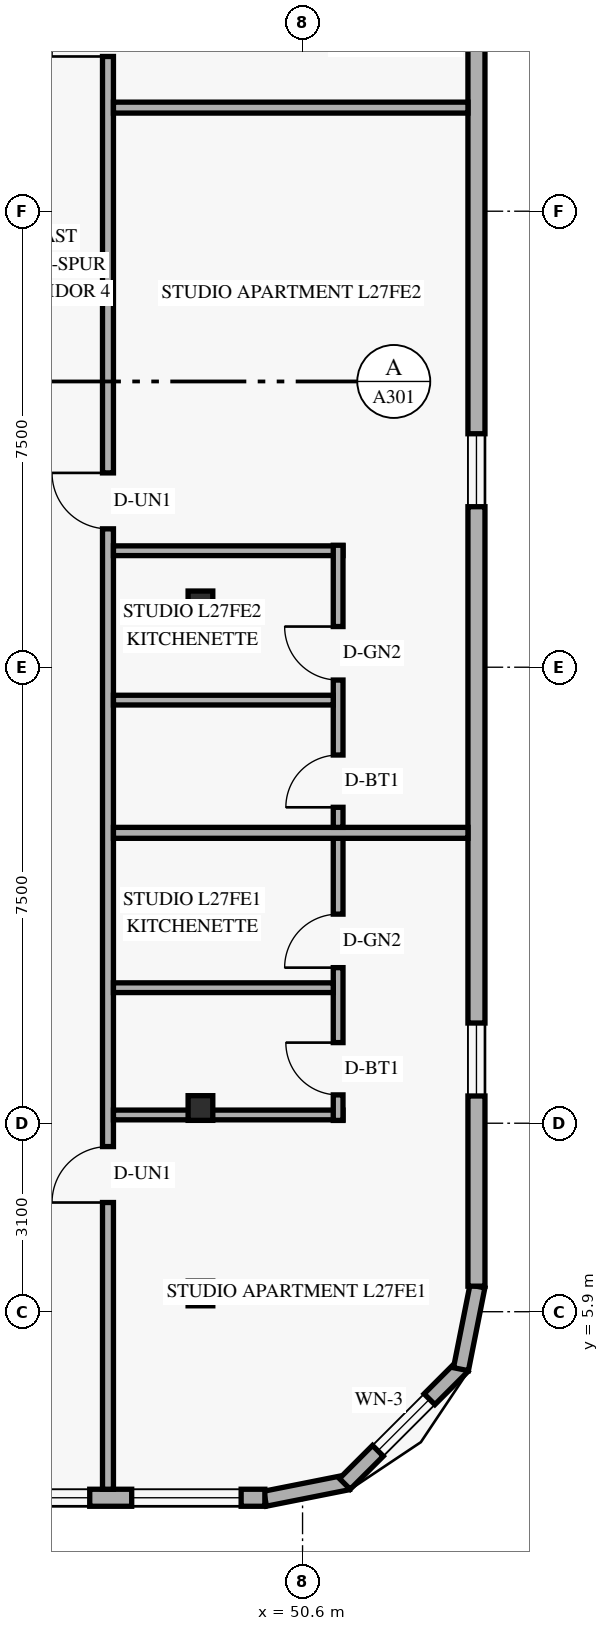
"""IFC4 building model, lengths in metres.
Left out: names, types, materials, properties, quantities, classifications, styles, units other than length and angle.
Written with IfcOpenShell. Run it as: python <this file> out.ifc"""

import sys

from ifc_helpers import new_model, si_unit, direction, frame, frame_2d, origin, origin_2d, place, context, subcontext, project, spatial, rectangle, hollow_rectangle, extrude, element, fill, save


model = new_model("IFC4")
c1 = context("Model", 3, precision=1e-05, world=origin(), true_north=direction((0.0, 1.0)))
c2 = subcontext(c1, "Body", "Model", "MODEL_VIEW")
j1 = project(units=[si_unit("LENGTHUNIT", "METRE"), si_unit("PLANEANGLEUNIT", "RADIAN")], contexts=[c1])
p1 = place(None, origin())
s1 = spatial("IfcSite", under=j1, at=p1, CompositionType="ELEMENT")
p2 = place(p1, origin())
s2 = spatial("IfcBuilding", under=s1, at=p2, CompositionType="ELEMENT")
p3 = place(p2, frame((0.0, 0.0, 106.2)))
s3 = spatial("IfcBuildingStorey", under=s2, at=p3, CompositionType="ELEMENT", Elevation=106.2)
for number, where, z_axis, x_axis in (
    (1, (48.816, 6.2, 0.0), (0.058, 0.0, 0.998), (0.0, 1.0, 0.0)),
    (2, (48.816, 9.25, 0.0), (0.058, 0.0, 0.998), (0.0, 1.0, 0.0)),
    (3, (48.816, 17.55, 0.0), (0.058, 0.0, 0.998), (0.0, 1.0, 0.0)),
):
    element("IfcColumn", number, at=place(p3, frame(where, z_axis=z_axis, x_axis=x_axis)), inside=s3, PredefinedType="COLUMN", context=c2, shape_type="SweptSolid", body=[
        extrude(hollow_rectangle(XDim=0.406, YDim=0.406, WallThickness=0.016, at=origin_2d()), origin(), (0.0, 0.0, 1.0), 3.606),
    ])
p4 = place(p3, frame((49.983, 2.824, 0.0), z_axis=(0.0, 0.0, 1.0), x_axis=(0.980809899341, 0.19496651342, 0.0)))
e4 = element("IfcWall", 4, at=p4, inside=s3, PredefinedType="SOLIDWALL", context=c2, shape_type="SweptSolid", body=[
    extrude(rectangle(XDim=1.389, YDim=0.25, at=frame_2d((0.694, 0.0))), origin(), (0.0, 0.0, 1.0), 3.36),
])
p5 = place(p3, frame((51.295, 3.068, 0.0), z_axis=(0.0, 0.0, 1.0), x_axis=(0.707151344399, 0.707062215165, 0.0)))
e5 = element("IfcWall", 5, at=p5, inside=s3, PredefinedType="SOLIDWALL", context=c2, shape_type="SweptSolid", body=[
    extrude(rectangle(XDim=2.739, YDim=0.25, at=frame_2d((1.37, 0.0))), origin(), (0.0, 0.0, 1.0), 3.36),
])
p6 = place(p5, frame((0.77, 0.0, 0.85)))
e6 = element("IfcOpeningElement", 6, at=p6, cuts=e5, PredefinedType="OPENING", context=c2, shape_type="SweptSolid", body=[
    extrude(rectangle(XDim=1.2, YDim=1.5, at=frame_2d((0.6, 0.75))), frame((0.0, 0.135, 0.0), z_axis=(0.0, -1.0, 0.0), x_axis=(1.0, 0.0, 0.0)), (0.0, 0.0, 1.0), 0.27),
])
p7 = place(p3, frame((53.205, 4.955, 0.0), z_axis=(0.0, 0.0, 1.0), x_axis=(0.195000137217, 0.980803214965, 0.0)))
e7 = element("IfcWall", 7, at=p7, inside=s3, PredefinedType="SOLIDWALL", context=c2, shape_type="SweptSolid", body=[
    extrude(rectangle(XDim=1.388, YDim=0.25, at=frame_2d((0.694, 0.0))), origin(), (0.0, 0.0, 1.0), 3.36),
])
p8 = place(p3, frame((13.42, 2.84, 0.0), z_axis=(0.0, 0.0, 1.0), x_axis=(1.0, 0.0, 0.0)))
e8 = element("IfcWall", 8, at=p8, inside=s3, PredefinedType="SOLIDWALL", context=c2, shape_type="SweptSolid", body=[
    extrude(rectangle(XDim=36.56, YDim=0.28, at=frame_2d((18.28, 0.0))), origin(), (0.0, 0.0, 1.0), 3.36),
])
p9 = place(p8, frame((3.215, 0.0, 0.85)))
e9 = element("IfcOpeningElement", 9, at=p9, cuts=e8, PredefinedType="OPENING", context=c2, shape_type="SweptSolid", body=[
    extrude(rectangle(XDim=1.8, YDim=1.6, at=frame_2d((0.9, 0.8))), frame((0.0, 0.15, 0.0), z_axis=(0.0, -1.0, 0.0), x_axis=(1.0, 0.0, 0.0)), (0.0, 0.0, 1.0), 0.3),
])
p10 = place(p8, frame((10.055, 0.0, 0.85)))
e10 = element("IfcOpeningElement", 10, at=p10, cuts=e8, PredefinedType="OPENING", context=c2, shape_type="SweptSolid", body=[
    extrude(rectangle(XDim=1.8, YDim=1.6, at=frame_2d((0.9, 0.8))), frame((0.0, 0.15, 0.0), z_axis=(0.0, -1.0, 0.0), x_axis=(1.0, 0.0, 0.0)), (0.0, 0.0, 1.0), 0.3),
])
p11 = place(p8, frame((16.94, 0.0, 0.85)))
e11 = element("IfcOpeningElement", 11, at=p11, cuts=e8, PredefinedType="OPENING", context=c2, shape_type="SweptSolid", body=[
    extrude(rectangle(XDim=1.8, YDim=1.6, at=frame_2d((0.9, 0.8))), frame((0.0, 0.15, 0.0), z_axis=(0.0, -1.0, 0.0), x_axis=(1.0, 0.0, 0.0)), (0.0, 0.0, 1.0), 0.3),
])
p12 = place(p8, frame((22.365, 0.0, 0.85)))
e12 = element("IfcOpeningElement", 12, at=p12, cuts=e8, PredefinedType="OPENING", context=c2, shape_type="SweptSolid", body=[
    extrude(rectangle(XDim=1.8, YDim=1.6, at=frame_2d((0.9, 0.8))), frame((0.0, 0.15, 0.0), z_axis=(0.0, -1.0, 0.0), x_axis=(1.0, 0.0, 0.0)), (0.0, 0.0, 1.0), 0.3),
])
p13 = place(p8, frame((27.455, 0.0, 0.85)))
e13 = element("IfcOpeningElement", 13, at=p13, cuts=e8, PredefinedType="OPENING", context=c2, shape_type="SweptSolid", body=[
    extrude(rectangle(XDim=1.8, YDim=1.6, at=frame_2d((0.9, 0.8))), frame((0.0, 0.15, 0.0), z_axis=(0.0, -1.0, 0.0), x_axis=(1.0, 0.0, 0.0)), (0.0, 0.0, 1.0), 0.3),
])
p14 = place(p8, frame((32.48, 0.0, 0.85)))
e14 = element("IfcOpeningElement", 14, at=p14, cuts=e8, PredefinedType="OPENING", context=c2, shape_type="SweptSolid", body=[
    extrude(rectangle(XDim=1.2, YDim=1.5, at=frame_2d((0.6, 0.75))), frame((0.0, 0.15, 0.0), z_axis=(0.0, -1.0, 0.0), x_axis=(1.0, 0.0, 0.0)), (0.0, 0.0, 1.0), 0.3),
])
p15 = place(p8, frame((34.37, 0.0, 0.85)))
e15 = element("IfcOpeningElement", 15, at=p15, cuts=e8, PredefinedType="OPENING", context=c2, shape_type="SweptSolid", body=[
    extrude(rectangle(XDim=1.8, YDim=1.6, at=frame_2d((0.9, 0.8))), frame((0.0, 0.15, 0.0), z_axis=(0.0, -1.0, 0.0), x_axis=(1.0, 0.0, 0.0)), (0.0, 0.0, 1.0), 0.3),
])
p16 = place(p3, frame((53.46, 6.32, 0.0), z_axis=(0.0, 0.0, 1.0), x_axis=(0.0, 1.0, 0.0)))
e16 = element("IfcWall", 16, at=p16, inside=s3, PredefinedType="SOLIDWALL", context=c2, shape_type="SweptSolid", body=[
    extrude(rectangle(XDim=35.36, YDim=0.28, at=frame_2d((17.68, 0.0))), origin(), (0.0, 0.0, 1.0), 3.36),
])
p17 = place(p16, frame((3.128, 0.0, 0.85)))
e17 = element("IfcOpeningElement", 17, at=p17, cuts=e16, PredefinedType="OPENING", context=c2, shape_type="SweptSolid", body=[
    extrude(rectangle(XDim=1.2, YDim=1.5, at=frame_2d((0.6, 0.75))), frame((0.0, 0.15, 0.0), z_axis=(0.0, -1.0, 0.0), x_axis=(1.0, 0.0, 0.0)), (0.0, 0.0, 1.0), 0.3),
])
p18 = place(p16, frame((12.82, 0.0, 0.85)))
e18 = element("IfcOpeningElement", 18, at=p18, cuts=e16, PredefinedType="OPENING", context=c2, shape_type="SweptSolid", body=[
    extrude(rectangle(XDim=1.2, YDim=1.5, at=frame_2d((0.6, 0.75))), frame((0.0, 0.15, 0.0), z_axis=(0.0, -1.0, 0.0), x_axis=(1.0, 0.0, 0.0)), (0.0, 0.0, 1.0), 0.3),
])
p19 = place(p16, frame((22.194, 0.0, 0.85)))
e19 = element("IfcOpeningElement", 19, at=p19, cuts=e16, PredefinedType="OPENING", context=c2, shape_type="SweptSolid", body=[
    extrude(rectangle(XDim=1.2, YDim=1.5, at=frame_2d((0.6, 0.75))), frame((0.0, 0.15, 0.0), z_axis=(0.0, -1.0, 0.0), x_axis=(1.0, 0.0, 0.0)), (0.0, 0.0, 1.0), 0.3),
])
p20 = place(p16, frame((27.306, 0.0, 0.85)))
e20 = element("IfcOpeningElement", 20, at=p20, cuts=e16, PredefinedType="OPENING", context=c2, shape_type="SweptSolid", body=[
    extrude(rectangle(XDim=1.2, YDim=1.5, at=frame_2d((0.6, 0.75))), frame((0.0, 0.15, 0.0), z_axis=(0.0, -1.0, 0.0), x_axis=(1.0, 0.0, 0.0)), (0.0, 0.0, 1.0), 0.3),
])
p21 = place(p16, frame((31.884, 0.0, 0.85)))
e21 = element("IfcOpeningElement", 21, at=p21, cuts=e16, PredefinedType="OPENING", context=c2, shape_type="SweptSolid", body=[
    extrude(rectangle(XDim=1.2, YDim=1.5, at=frame_2d((0.6, 0.75))), frame((0.0, 0.15, 0.0), z_axis=(0.0, -1.0, 0.0), x_axis=(1.0, 0.0, 0.0)), (0.0, 0.0, 1.0), 0.3),
])
p22 = place(p3, frame((47.4, 2.98, 0.0), z_axis=(0.0, 0.0, 1.0), x_axis=(0.0, 1.0, 0.0)))
e22 = element("IfcWall", 22, at=p22, inside=s3, PredefinedType="STANDARD", context=c2, shape_type="SweptSolid", body=[
    extrude(rectangle(XDim=42.04, YDim=0.18, at=frame_2d((21.02, 0.0))), origin(), (0.0, 0.0, 1.0), 2.731),
])
p23 = place(p22, frame((4.716, 0.0, 0.0)))
e23 = element("IfcOpeningElement", 23, at=p23, cuts=e22, PredefinedType="OPENING", context=c2, shape_type="SweptSolid", body=[
    extrude(rectangle(XDim=0.92, YDim=2.15, at=frame_2d((0.46, 1.075))), frame((0.0, 0.1, 0.0), z_axis=(0.0, -1.0, 0.0), x_axis=(1.0, 0.0, 0.0)), (0.0, 0.0, 1.0), 0.2),
])
p24 = place(p22, frame((15.796, 0.0, 0.0)))
e24 = element("IfcOpeningElement", 24, at=p24, cuts=e22, PredefinedType="OPENING", context=c2, shape_type="SweptSolid", body=[
    extrude(rectangle(XDim=0.92, YDim=2.15, at=frame_2d((0.46, 1.075))), frame((0.0, 0.1, 0.0), z_axis=(0.0, -1.0, 0.0), x_axis=(1.0, 0.0, 0.0)), (0.0, 0.0, 1.0), 0.2),
])
p25 = place(p22, frame((23.565, 0.0, 0.0)))
e25 = element("IfcOpeningElement", 25, at=p25, cuts=e22, PredefinedType="OPENING", context=c2, shape_type="SweptSolid", body=[
    extrude(rectangle(XDim=0.92, YDim=2.15, at=frame_2d((0.46, 1.075))), frame((0.0, 0.1, 0.0), z_axis=(0.0, -1.0, 0.0), x_axis=(1.0, 0.0, 0.0)), (0.0, 0.0, 1.0), 0.2),
])
p26 = place(p22, frame((39.348, 0.0, 0.0)))
e26 = element("IfcOpeningElement", 26, at=p26, cuts=e22, PredefinedType="OPENING", context=c2, shape_type="SweptSolid", body=[
    extrude(rectangle(XDim=0.92, YDim=2.15, at=frame_2d((0.46, 1.075))), frame((0.0, 0.1, 0.0), z_axis=(0.0, -1.0, 0.0), x_axis=(1.0, 0.0, 0.0)), (0.0, 0.0, 1.0), 0.2),
])
p27 = place(p3, frame((47.49, 9.136, 0.0), z_axis=(0.0, 0.0, 1.0), x_axis=(1.0, 0.0, 0.0)))
e27 = element("IfcWall", 27, at=p27, inside=s3, PredefinedType="PLUMBINGWALL", context=c2, shape_type="SweptSolid", body=[
    extrude(rectangle(XDim=3.775, YDim=0.16, at=frame_2d((1.888, 0.0))), origin(), (0.0, 0.0, 1.0), 2.731),
])
p28 = place(p3, frame((51.185, 9.046, 0.0), z_axis=(0.0, 0.0, 1.0), x_axis=(0.0, 1.0, 0.0)))
e28 = element("IfcWall", 28, at=p28, inside=s3, PredefinedType="PLUMBINGWALL", context=c2, shape_type="SweptSolid", body=[
    extrude(rectangle(XDim=4.73, YDim=0.16, at=frame_2d((2.365, 0.0))), origin(), (0.0, 0.0, 1.0), 3.36),
])
p29 = place(p28, frame((0.42, 0.0, 0.0)))
e29 = element("IfcOpeningElement", 29, at=p29, cuts=e28, PredefinedType="OPENING", context=c2, shape_type="SweptSolid", body=[
    extrude(rectangle(XDim=0.86, YDim=2.12, at=frame_2d((0.43, 1.06))), frame((0.0, 0.09, 0.0), z_axis=(0.0, -1.0, 0.0), x_axis=(1.0, 0.0, 0.0)), (0.0, 0.0, 1.0), 0.18),
])
p30 = place(p28, frame((2.513, 0.0, 0.0)))
e30 = element("IfcOpeningElement", 30, at=p30, cuts=e28, PredefinedType="OPENING", context=c2, shape_type="SweptSolid", body=[
    extrude(rectangle(XDim=0.88, YDim=2.12, at=frame_2d((0.44, 1.06))), frame((0.0, 0.09, 0.0), z_axis=(0.0, -1.0, 0.0), x_axis=(1.0, 0.0, 0.0)), (0.0, 0.0, 1.0), 0.18),
])
p31 = place(p3, frame((47.49, 11.229, 0.0), z_axis=(0.0, 0.0, 1.0), x_axis=(1.0, 0.0, 0.0)))
e31 = element("IfcWall", 31, at=p31, inside=s3, PredefinedType="PLUMBINGWALL", context=c2, shape_type="SweptSolid", body=[
    extrude(rectangle(XDim=3.615, YDim=0.16, at=frame_2d((1.808, 0.0))), origin(), (0.0, 0.0, 1.0), 2.809),
])
p32 = place(p3, frame((47.49, 13.776, 0.0), z_axis=(0.0, 0.0, 1.0), x_axis=(1.0, 0.0, 0.0)))
e32 = element("IfcWall", 32, at=p32, inside=s3, PredefinedType="PARTITIONING", context=c2, shape_type="SweptSolid", body=[
    extrude(rectangle(XDim=5.83, YDim=0.18, at=frame_2d((2.915, 0.0))), origin(), (0.0, 0.0, 1.0), 2.809),
])
p33 = place(p3, frame((47.49, 18.416, 0.0), z_axis=(0.0, 0.0, 1.0), x_axis=(1.0, 0.0, 0.0)))
e33 = element("IfcWall", 33, at=p33, inside=s3, PredefinedType="PLUMBINGWALL", context=c2, shape_type="SweptSolid", body=[
    extrude(rectangle(XDim=3.775, YDim=0.16, at=frame_2d((1.888, 0.0))), origin(), (0.0, 0.0, 1.0), 2.809),
])
p34 = place(p3, frame((51.185, 13.866, 0.0), z_axis=(0.0, 0.0, 1.0), x_axis=(0.0, 1.0, 0.0)))
e34 = element("IfcWall", 34, at=p34, inside=s3, PredefinedType="PLUMBINGWALL", context=c2, shape_type="SweptSolid", body=[
    extrude(rectangle(XDim=4.64, YDim=0.16, at=frame_2d((2.32, 0.0))), origin(), (0.0, 0.0, 1.0), 3.36),
])
p35 = place(p34, frame((0.33, 0.0, 0.0)))
e35 = element("IfcOpeningElement", 35, at=p35, cuts=e34, PredefinedType="OPENING", context=c2, shape_type="SweptSolid", body=[
    extrude(rectangle(XDim=0.86, YDim=2.12, at=frame_2d((0.43, 1.06))), frame((0.0, 0.09, 0.0), z_axis=(0.0, -1.0, 0.0), x_axis=(1.0, 0.0, 0.0)), (0.0, 0.0, 1.0), 0.18),
])
p36 = place(p34, frame((2.423, 0.0, 0.0)))
e36 = element("IfcOpeningElement", 36, at=p36, cuts=e34, PredefinedType="OPENING", context=c2, shape_type="SweptSolid", body=[
    extrude(rectangle(XDim=0.88, YDim=2.12, at=frame_2d((0.44, 1.06))), frame((0.0, 0.09, 0.0), z_axis=(0.0, -1.0, 0.0), x_axis=(1.0, 0.0, 0.0)), (0.0, 0.0, 1.0), 0.18),
])
p37 = place(p3, frame((47.49, 15.959, 0.0), z_axis=(0.0, 0.0, 1.0), x_axis=(1.0, 0.0, 0.0)))
e37 = element("IfcWall", 37, at=p37, inside=s3, PredefinedType="PLUMBINGWALL", context=c2, shape_type="SweptSolid", body=[
    extrude(rectangle(XDim=3.615, YDim=0.16, at=frame_2d((1.808, 0.0))), origin(), (0.0, 0.0, 1.0), 2.809),
])
p38 = place(p3, frame((47.49, 25.704, 0.0), z_axis=(0.0, 0.0, 1.0), x_axis=(1.0, 0.0, 0.0)))
e38 = element("IfcWall", 38, at=p38, inside=s3, PredefinedType="PARTITIONING", context=c2, shape_type="SweptSolid", body=[
    extrude(rectangle(XDim=5.83, YDim=0.18, at=frame_2d((2.915, 0.0))), origin(), (0.0, 0.0, 1.0), 2.809),
])
p39 = place(p6, origin())
e39 = element("IfcWindow", 39, at=p39, inside=s3, PartitioningType="SINGLE_PANEL", PredefinedType="WINDOW", context=c2, shape_type="SweptSolid", body=[
    extrude(rectangle(XDim=1.2, YDim=1.5, at=frame_2d((0.6, 0.75))), frame((0.0, 0.03, 0.0), z_axis=(0.0, -1.0, 0.0), x_axis=(1.0, 0.0, 0.0)), (0.0, 0.0, 1.0), 0.06),
])
fill(e6, e39)
p40 = place(p14, origin())
e40 = element("IfcWindow", 40, at=p40, inside=s3, PartitioningType="SINGLE_PANEL", PredefinedType="WINDOW", context=c2, shape_type="SweptSolid", body=[
    extrude(rectangle(XDim=1.2, YDim=1.5, at=frame_2d((0.6, 0.75))), frame((0.0, 0.03, 0.0), z_axis=(0.0, -1.0, 0.0), x_axis=(1.0, 0.0, 0.0)), (0.0, 0.0, 1.0), 0.06),
])
fill(e14, e40)
p41 = place(p15, origin())
e41 = element("IfcWindow", 41, at=p41, inside=s3, PartitioningType="SINGLE_PANEL", PredefinedType="WINDOW", context=c2, shape_type="SweptSolid", body=[
    extrude(rectangle(XDim=1.8, YDim=1.6, at=frame_2d((0.9, 0.8))), frame((0.0, 0.03, 0.0), z_axis=(0.0, -1.0, 0.0), x_axis=(1.0, 0.0, 0.0)), (0.0, 0.0, 1.0), 0.06),
])
fill(e15, e41)
p42 = place(p17, origin())
e42 = element("IfcWindow", 42, at=p42, inside=s3, PartitioningType="SINGLE_PANEL", PredefinedType="WINDOW", context=c2, shape_type="SweptSolid", body=[
    extrude(rectangle(XDim=1.2, YDim=1.5, at=frame_2d((0.6, 0.75))), frame((0.0, 0.03, 0.0), z_axis=(0.0, -1.0, 0.0), x_axis=(1.0, 0.0, 0.0)), (0.0, 0.0, 1.0), 0.06),
])
fill(e17, e42)
p43 = place(p18, origin())
e43 = element("IfcWindow", 43, at=p43, inside=s3, PartitioningType="SINGLE_PANEL", PredefinedType="WINDOW", context=c2, shape_type="SweptSolid", body=[
    extrude(rectangle(XDim=1.2, YDim=1.5, at=frame_2d((0.6, 0.75))), frame((0.0, 0.03, 0.0), z_axis=(0.0, -1.0, 0.0), x_axis=(1.0, 0.0, 0.0)), (0.0, 0.0, 1.0), 0.06),
])
fill(e18, e43)
p44 = place(p23, origin())
e44 = element("IfcDoor", 44, at=p44, inside=s3, OperationType="SINGLE_SWING_LEFT", PredefinedType="DOOR", context=c2, shape_type="SweptSolid", body=[
    extrude(rectangle(XDim=0.92, YDim=2.15, at=frame_2d((0.46, 1.075))), frame((0.0, 0.025, 0.0), z_axis=(0.0, -1.0, 0.0), x_axis=(1.0, 0.0, 0.0)), (0.0, 0.0, 1.0), 0.05),
])
fill(e23, e44)
p45 = place(p29, origin())
e45 = element("IfcDoor", 45, at=p45, inside=s3, OperationType="SINGLE_SWING_RIGHT", PredefinedType="DOOR", context=c2, shape_type="SweptSolid", body=[
    extrude(rectangle(XDim=0.86, YDim=2.12, at=frame_2d((0.43, 1.06))), frame((0.0, 0.025, 0.0), z_axis=(0.0, -1.0, 0.0), x_axis=(1.0, 0.0, 0.0)), (0.0, 0.0, 1.0), 0.05),
])
fill(e29, e45)
p46 = place(p30, origin())
e46 = element("IfcDoor", 46, at=p46, inside=s3, OperationType="SINGLE_SWING_LEFT", PredefinedType="DOOR", context=c2, shape_type="SweptSolid", body=[
    extrude(rectangle(XDim=0.88, YDim=2.12, at=frame_2d((0.44, 1.06))), frame((0.0, 0.025, 0.0), z_axis=(0.0, -1.0, 0.0), x_axis=(1.0, 0.0, 0.0)), (0.0, 0.0, 1.0), 0.05),
])
fill(e30, e46)
p47 = place(p24, origin())
e47 = element("IfcDoor", 47, at=p47, inside=s3, OperationType="SINGLE_SWING_RIGHT", PredefinedType="DOOR", context=c2, shape_type="SweptSolid", body=[
    extrude(rectangle(XDim=0.92, YDim=2.15, at=frame_2d((0.46, 1.075))), frame((0.0, 0.025, 0.0), z_axis=(0.0, -1.0, 0.0), x_axis=(1.0, 0.0, 0.0)), (0.0, 0.0, 1.0), 0.05),
])
fill(e24, e47)
p48 = place(p35, origin())
e48 = element("IfcDoor", 48, at=p48, inside=s3, OperationType="SINGLE_SWING_LEFT", PredefinedType="DOOR", context=c2, shape_type="SweptSolid", body=[
    extrude(rectangle(XDim=0.86, YDim=2.12, at=frame_2d((0.43, 1.06))), frame((0.0, 0.025, 0.0), z_axis=(0.0, -1.0, 0.0), x_axis=(1.0, 0.0, 0.0)), (0.0, 0.0, 1.0), 0.05),
])
fill(e35, e48)
p49 = place(p36, origin())
e49 = element("IfcDoor", 49, at=p49, inside=s3, OperationType="SINGLE_SWING_RIGHT", PredefinedType="DOOR", context=c2, shape_type="SweptSolid", body=[
    extrude(rectangle(XDim=0.88, YDim=2.12, at=frame_2d((0.44, 1.06))), frame((0.0, 0.025, 0.0), z_axis=(0.0, -1.0, 0.0), x_axis=(1.0, 0.0, 0.0)), (0.0, 0.0, 1.0), 0.05),
])
fill(e36, e49)
p50 = place(p25, origin())
e50 = element("IfcDoor", 50, at=p50, inside=s3, OperationType="SINGLE_SWING_LEFT", PredefinedType="DOOR", context=c2, shape_type="SweptSolid", body=[
    extrude(rectangle(XDim=0.92, YDim=2.15, at=frame_2d((0.46, 1.075))), frame((0.0, 0.025, 0.0), z_axis=(0.0, -1.0, 0.0), x_axis=(1.0, 0.0, 0.0)), (0.0, 0.0, 1.0), 0.05),
])
fill(e25, e50)
save(model, sys.argv[1])
